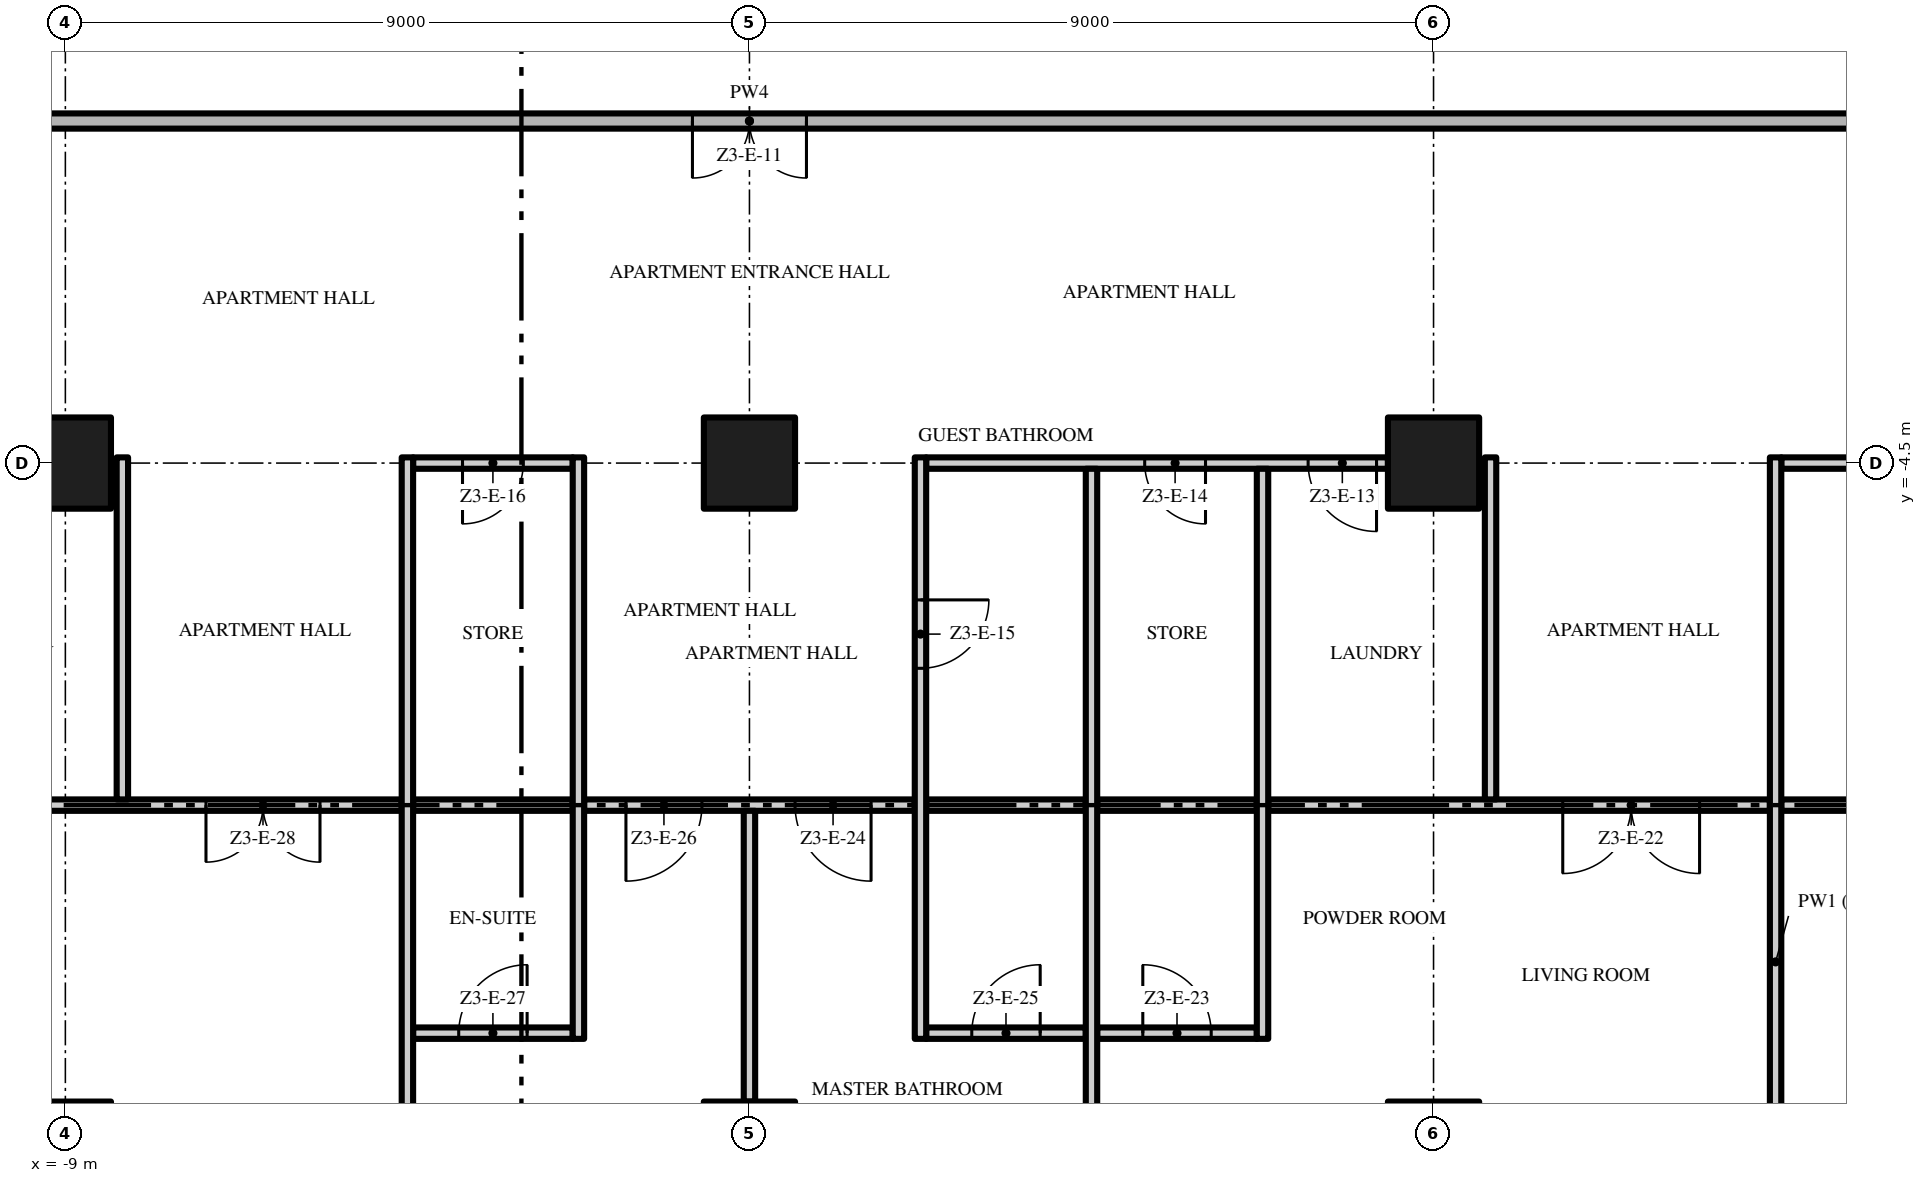
"""IFC4 building model, lengths in metres.
Left out: names, types, materials, properties, quantities, classifications, styles, units other than length and angle.
Written with IfcOpenShell. Run it as: python <this file> out.ifc"""

import sys

from ifc_helpers import new_model, si_unit, direction, frame, frame_2d, origin, origin_2d, place, context, subcontext, project, spatial, rectangle, extrude, element, fill, save


model = new_model("IFC4")
c1 = context("Model", 3, precision=1e-05, world=origin(), true_north=direction((0.0, 1.0)))
c2 = subcontext(c1, "Body", "Model", "MODEL_VIEW")
j1 = project(units=[si_unit("LENGTHUNIT", "METRE"), si_unit("PLANEANGLEUNIT", "RADIAN")], contexts=[c1])
p1 = place(None, origin())
s1 = spatial("IfcSite", under=j1, at=p1, CompositionType="ELEMENT")
p2 = place(p1, origin())
s2 = spatial("IfcBuilding", under=s1, at=p2, CompositionType="ELEMENT")
p3 = place(p2, frame((0.0, 0.0, 166.8)))
s3 = spatial("IfcBuildingStorey", under=s2, at=p3, CompositionType="ELEMENT", Elevation=166.8)
for number, where, z_axis, x_axis in (
    (1, (-9.0, -13.5, 0.0), (0.0, 0.0, 1.0), (1.0, 0.0, 0.0)),
    (2, (-9.0, -4.5, 0.0), (0.0, 0.0, 1.0), (1.0, 0.0, 0.0)),
    (3, (0.0, -13.5, 0.0), (0.0, 0.0, 1.0), (1.0, 0.0, 0.0)),
    (4, (0.0, -4.5, 0.0), (0.0, 0.0, 1.0), (1.0, 0.0, 0.0)),
    (5, (9.0, -13.5, 0.0), (0.0, 0.0, 1.0), (1.0, 0.0, 0.0)),
    (6, (9.0, -4.5, 0.0), (0.0, 0.0, 1.0), (1.0, 0.0, 0.0)),
):
    element("IfcColumn", number, at=place(p3, frame(where, z_axis=z_axis, x_axis=x_axis)), inside=s3, PredefinedType="COLUMN", context=c2, shape_type="SweptSolid", body=[
        extrude(rectangle(XDim=1.2, YDim=1.2, at=origin_2d()), origin(), (0.0, 0.0, 1.0), 3.5),
    ])
p4 = place(p3, frame((-4.425, -12.0, 0.0), z_axis=(0.0, 0.0, 1.0), x_axis=(1.0, 0.0, 0.0)))
e7 = element("IfcWall", 7, at=p4, inside=s3, PredefinedType="PARTITIONING", context=c2, shape_type="SweptSolid", body=[
    extrude(rectangle(XDim=2.1, YDim=0.15, at=frame_2d((1.05, 0.0))), origin(), (0.0, 0.0, 1.0), 3.5),
])
p5 = place(p4, frame((0.6, 0.0, 0.0)))
e8 = element("IfcOpeningElement", 8, at=p5, cuts=e7, PredefinedType="OPENING", context=c2, shape_type="SweptSolid", body=[
    extrude(rectangle(XDim=0.9, YDim=2.1, at=frame_2d((0.45, 1.05))), frame((0.0, 0.085, 0.0), z_axis=(0.0, -1.0, 0.0), x_axis=(1.0, 0.0, 0.0)), (0.0, 0.0, 1.0), 0.17),
])
p6 = place(p3, frame((2.325, -12.0, 0.0), z_axis=(0.0, 0.0, 1.0), x_axis=(1.0, 0.0, 0.0)))
e9 = element("IfcWall", 9, at=p6, inside=s3, PredefinedType="PARTITIONING", context=c2, shape_type="SweptSolid", body=[
    extrude(rectangle(XDim=2.1, YDim=0.15, at=frame_2d((1.05, 0.0))), origin(), (0.0, 0.0, 1.0), 3.5),
])
p7 = place(p6, frame((0.6, 0.0, 0.0)))
e10 = element("IfcOpeningElement", 10, at=p7, cuts=e9, PredefinedType="OPENING", context=c2, shape_type="SweptSolid", body=[
    extrude(rectangle(XDim=0.9, YDim=2.1, at=frame_2d((0.45, 1.05))), frame((0.0, 0.085, 0.0), z_axis=(0.0, -1.0, 0.0), x_axis=(1.0, 0.0, 0.0)), (0.0, 0.0, 1.0), 0.17),
])
p8 = place(p3, frame((4.575, -12.0, 0.0), z_axis=(0.0, 0.0, 1.0), x_axis=(1.0, 0.0, 0.0)))
e11 = element("IfcWall", 11, at=p8, inside=s3, PredefinedType="PARTITIONING", context=c2, shape_type="SweptSolid", body=[
    extrude(rectangle(XDim=2.1, YDim=0.15, at=frame_2d((1.05, 0.0))), origin(), (0.0, 0.0, 1.0), 3.5),
])
p9 = place(p8, frame((0.6, 0.0, 0.0)))
e12 = element("IfcOpeningElement", 12, at=p9, cuts=e11, PredefinedType="OPENING", context=c2, shape_type="SweptSolid", body=[
    extrude(rectangle(XDim=0.9, YDim=2.1, at=frame_2d((0.45, 1.05))), frame((0.0, 0.085, 0.0), z_axis=(0.0, -1.0, 0.0), x_axis=(1.0, 0.0, 0.0)), (0.0, 0.0, 1.0), 0.17),
])
p10 = place(p3, frame((-4.575, -9.0, 0.0), z_axis=(0.0, 0.0, 1.0), x_axis=(-1.0, 0.0, 0.0)))
e13 = element("IfcWall", 13, at=p10, inside=s3, PredefinedType="PARTITIONING", context=c2, shape_type="SweptSolid", body=[
    extrude(rectangle(XDim=8.85, YDim=0.15, at=frame_2d((4.425, 0.0))), origin(), (0.0, 0.0, 1.0), 3.5),
])
p11 = place(p10, frame((1.075, 0.0, 0.0)))
e14 = element("IfcOpeningElement", 14, at=p11, cuts=e13, PredefinedType="OPENING", context=c2, shape_type="SweptSolid", body=[
    extrude(rectangle(XDim=1.5, YDim=2.4, at=frame_2d((0.75, 1.2))), frame((0.0, 0.085, 0.0), z_axis=(0.0, -1.0, 0.0), x_axis=(1.0, 0.0, 0.0)), (0.0, 0.0, 1.0), 0.17),
])
p12 = place(p3, frame((-4.425, -9.0, 0.0), z_axis=(0.0, 0.0, 1.0), x_axis=(1.0, 0.0, 0.0)))
e15 = element("IfcWall", 15, at=p12, inside=s3, PredefinedType="PARTITIONING", context=c2, shape_type="SweptSolid", body=[
    extrude(rectangle(XDim=2.1, YDim=0.15, at=frame_2d((1.05, 0.0))), origin(), (0.0, 0.0, 1.0), 3.5),
])
p13 = place(p3, frame((2.175, -9.0, 0.0), z_axis=(0.0, 0.0, 1.0), x_axis=(-1.0, 0.0, 0.0)))
e16 = element("IfcWall", 16, at=p13, inside=s3, PredefinedType="PARTITIONING", context=c2, shape_type="SweptSolid", body=[
    extrude(rectangle(XDim=4.35, YDim=0.15, at=frame_2d((2.175, 0.0))), origin(), (0.0, 0.0, 1.0), 3.5),
])
p14 = place(p13, frame((0.575, 0.0, 0.0)))
e17 = element("IfcOpeningElement", 17, at=p14, cuts=e16, PredefinedType="OPENING", context=c2, shape_type="SweptSolid", body=[
    extrude(rectangle(XDim=1.0, YDim=2.4, at=frame_2d((0.5, 1.2))), frame((0.0, 0.085, 0.0), z_axis=(0.0, -1.0, 0.0), x_axis=(1.0, 0.0, 0.0)), (0.0, 0.0, 1.0), 0.17),
])
p15 = place(p13, frame((2.8, 0.0, 0.0)))
e18 = element("IfcOpeningElement", 18, at=p15, cuts=e16, PredefinedType="OPENING", context=c2, shape_type="SweptSolid", body=[
    extrude(rectangle(XDim=1.0, YDim=2.4, at=frame_2d((0.5, 1.2))), frame((0.0, 0.085, 0.0), z_axis=(0.0, -1.0, 0.0), x_axis=(1.0, 0.0, 0.0)), (0.0, 0.0, 1.0), 0.17),
])
for number, where, z_axis, x_axis in (
    (19, (2.325, -9.0, 0.0), (0.0, 0.0, 1.0), (1.0, 0.0, 0.0)),
    (20, (4.575, -9.0, 0.0), (0.0, 0.0, 1.0), (1.0, 0.0, 0.0)),
):
    element("IfcWall", number, at=place(p3, frame(where, z_axis=z_axis, x_axis=x_axis)), inside=s3, PredefinedType="PARTITIONING", context=c2, shape_type="SweptSolid", body=[
        extrude(rectangle(XDim=2.1, YDim=0.15, at=frame_2d((1.05, 0.0))), origin(), (0.0, 0.0, 1.0), 3.5),
    ])
p16 = place(p3, frame((13.425, -9.0, 0.0), z_axis=(0.0, 0.0, 1.0), x_axis=(-1.0, 0.0, 0.0)))
e21 = element("IfcWall", 21, at=p16, inside=s3, PredefinedType="PARTITIONING", context=c2, shape_type="SweptSolid", body=[
    extrude(rectangle(XDim=6.6, YDim=0.15, at=frame_2d((3.3, 0.0))), origin(), (0.0, 0.0, 1.0), 3.5),
])
p17 = place(p16, frame((0.925, 0.0, 0.0)))
e22 = element("IfcOpeningElement", 22, at=p17, cuts=e21, PredefinedType="OPENING", context=c2, shape_type="SweptSolid", body=[
    extrude(rectangle(XDim=1.8, YDim=2.4, at=frame_2d((0.9, 1.2))), frame((0.0, 0.085, 0.0), z_axis=(0.0, -1.0, 0.0), x_axis=(1.0, 0.0, 0.0)), (0.0, 0.0, 1.0), 0.17),
])
p18 = place(p3, frame((22.2, -9.0, 0.0), z_axis=(0.0, 0.0, 1.0), x_axis=(-1.0, 0.0, 0.0)))
e23 = element("IfcWall", 23, at=p18, inside=s3, PredefinedType="PARTITIONING", context=c2, shape_type="SweptSolid", body=[
    extrude(rectangle(XDim=8.625, YDim=0.15, at=frame_2d((4.312, 0.0))), origin(), (0.0, 0.0, 1.0), 3.5),
])
p19 = place(p18, frame((0.8, 0.0, 0.0)))
e24 = element("IfcOpeningElement", 24, at=p19, cuts=e23, PredefinedType="OPENING", context=c2, shape_type="SweptSolid", body=[
    extrude(rectangle(XDim=1.5, YDim=2.4, at=frame_2d((0.75, 1.2))), frame((0.0, 0.085, 0.0), z_axis=(0.0, -1.0, 0.0), x_axis=(1.0, 0.0, 0.0)), (0.0, 0.0, 1.0), 0.17),
])
p20 = place(p3, frame((-2.325, -4.5, 0.0), z_axis=(0.0, 0.0, 1.0), x_axis=(-1.0, 0.0, 0.0)))
e25 = element("IfcWall", 25, at=p20, inside=s3, PredefinedType="PARTITIONING", context=c2, shape_type="SweptSolid", body=[
    extrude(rectangle(XDim=2.1, YDim=0.15, at=frame_2d((1.05, 0.0))), origin(), (0.0, 0.0, 1.0), 3.5),
])
p21 = place(p20, frame((0.65, 0.0, 0.0)))
e26 = element("IfcOpeningElement", 26, at=p21, cuts=e25, PredefinedType="OPENING", context=c2, shape_type="SweptSolid", body=[
    extrude(rectangle(XDim=0.8, YDim=2.0, at=frame_2d((0.4, 1.0))), frame((0.0, 0.085, 0.0), z_axis=(0.0, -1.0, 0.0), x_axis=(1.0, 0.0, 0.0)), (0.0, 0.0, 1.0), 0.17),
])
p22 = place(p3, frame((8.4, -4.5, 0.0), z_axis=(0.0, 0.0, 1.0), x_axis=(-1.0, 0.0, 0.0)))
e27 = element("IfcWall", 27, at=p22, inside=s3, PredefinedType="PARTITIONING", context=c2, shape_type="SweptSolid", body=[
    extrude(rectangle(XDim=6.075, YDim=0.15, at=frame_2d((3.038, 0.0))), origin(), (0.0, 0.0, 1.0), 3.5),
])
p23 = place(p22, frame((0.15, 0.0, 0.0)))
e28 = element("IfcOpeningElement", 28, at=p23, cuts=e27, PredefinedType="OPENING", context=c2, shape_type="SweptSolid", body=[
    extrude(rectangle(XDim=0.9, YDim=2.1, at=frame_2d((0.45, 1.05))), frame((0.0, 0.085, 0.0), z_axis=(0.0, -1.0, 0.0), x_axis=(1.0, 0.0, 0.0)), (0.0, 0.0, 1.0), 0.17),
])
p24 = place(p22, frame((2.4, 0.0, 0.0)))
e29 = element("IfcOpeningElement", 29, at=p24, cuts=e27, PredefinedType="OPENING", context=c2, shape_type="SweptSolid", body=[
    extrude(rectangle(XDim=0.8, YDim=2.0, at=frame_2d((0.4, 1.0))), frame((0.0, 0.085, 0.0), z_axis=(0.0, -1.0, 0.0), x_axis=(1.0, 0.0, 0.0)), (0.0, 0.0, 1.0), 0.17),
])
p25 = place(p3, frame((17.4, -4.5, 0.0), z_axis=(0.0, 0.0, 1.0), x_axis=(-1.0, 0.0, 0.0)))
e30 = element("IfcWall", 30, at=p25, inside=s3, PredefinedType="PARTITIONING", context=c2, shape_type="SweptSolid", body=[
    extrude(rectangle(XDim=3.825, YDim=0.15, at=frame_2d((1.913, 0.0))), origin(), (0.0, 0.0, 1.0), 3.5),
])
p26 = place(p25, frame((0.775, 0.0, 0.0)))
e31 = element("IfcOpeningElement", 31, at=p26, cuts=e30, PredefinedType="OPENING", context=c2, shape_type="SweptSolid", body=[
    extrude(rectangle(XDim=1.0, YDim=2.4, at=frame_2d((0.5, 1.2))), frame((0.0, 0.085, 0.0), z_axis=(0.0, -1.0, 0.0), x_axis=(1.0, 0.0, 0.0)), (0.0, 0.0, 1.0), 0.17),
])
p27 = place(p3, frame((17.5, 0.0, 0.0), z_axis=(0.0, 0.0, 1.0), x_axis=(-1.0, 0.0, 0.0)))
e32 = element("IfcWall", 32, at=p27, inside=s3, PredefinedType="PARTITIONING", context=c2, shape_type="SweptSolid", body=[
    extrude(rectangle(XDim=35.0, YDim=0.2, at=frame_2d((17.5, 0.0))), origin(), (0.0, 0.0, 1.0), 3.5),
])
p28 = place(p27, frame((16.75, 0.0, 0.0)))
e33 = element("IfcOpeningElement", 33, at=p28, cuts=e32, PredefinedType="OPENING", context=c2, shape_type="SweptSolid", body=[
    extrude(rectangle(XDim=1.5, YDim=2.4, at=frame_2d((0.75, 1.2))), frame((0.0, 0.11, 0.0), z_axis=(0.0, -1.0, 0.0), x_axis=(1.0, 0.0, 0.0)), (0.0, 0.0, 1.0), 0.22),
])
p29 = place(p3, frame((-8.25, -8.925, 0.0), z_axis=(0.0, 0.0, 1.0), x_axis=(0.0, 1.0, 0.0)))
e34 = element("IfcWall", 34, at=p29, inside=s3, PredefinedType="PARTITIONING", context=c2, shape_type="SweptSolid", body=[
    extrude(rectangle(XDim=4.5, YDim=0.15, at=frame_2d((2.25, 0.0))), origin(), (0.0, 0.0, 1.0), 3.5),
])
p30 = place(p3, frame((-4.5, -17.7, 0.0), z_axis=(0.0, 0.0, 1.0), x_axis=(0.0, 1.0, 0.0)))
e35 = element("IfcWall", 35, at=p30, inside=s3, PredefinedType="PARTITIONING", context=c2, shape_type="SweptSolid", body=[
    extrude(rectangle(XDim=13.275, YDim=0.15, at=frame_2d((6.638, 0.0))), origin(), (0.0, 0.0, 1.0), 3.5),
])
p31 = place(p3, frame((-2.25, -12.075, 0.0), z_axis=(0.0, 0.0, 1.0), x_axis=(0.0, 1.0, 0.0)))
e36 = element("IfcWall", 36, at=p31, inside=s3, PredefinedType="PARTITIONING", context=c2, shape_type="SweptSolid", body=[
    extrude(rectangle(XDim=7.65, YDim=0.15, at=frame_2d((3.825, 0.0))), origin(), (0.0, 0.0, 1.0), 3.5),
])
p32 = place(p3, frame((0.0, -12.9, 0.0), z_axis=(0.0, 0.0, 1.0), x_axis=(0.0, 1.0, 0.0)))
e37 = element("IfcWall", 37, at=p32, inside=s3, PredefinedType="PARTITIONING", context=c2, shape_type="SweptSolid", body=[
    extrude(rectangle(XDim=3.825, YDim=0.15, at=frame_2d((1.913, 0.0))), origin(), (0.0, 0.0, 1.0), 3.5),
])
p33 = place(p3, frame((2.25, -4.425, 0.0), z_axis=(0.0, 0.0, 1.0), x_axis=(0.0, -1.0, 0.0)))
e38 = element("IfcWall", 38, at=p33, inside=s3, PredefinedType="PARTITIONING", context=c2, shape_type="SweptSolid", body=[
    extrude(rectangle(XDim=7.65, YDim=0.15, at=frame_2d((3.825, 0.0))), origin(), (0.0, 0.0, 1.0), 3.5),
])
p34 = place(p33, frame((1.875, 0.0, 0.0)))
e39 = element("IfcOpeningElement", 39, at=p34, cuts=e38, PredefinedType="OPENING", context=c2, shape_type="SweptSolid", body=[
    extrude(rectangle(XDim=0.9, YDim=2.1, at=frame_2d((0.45, 1.05))), frame((0.0, 0.085, 0.0), z_axis=(0.0, -1.0, 0.0), x_axis=(1.0, 0.0, 0.0)), (0.0, 0.0, 1.0), 0.17),
])
p35 = place(p3, frame((4.5, -17.7, 0.0), z_axis=(0.0, 0.0, 1.0), x_axis=(0.0, 1.0, 0.0)))
e40 = element("IfcWall", 40, at=p35, inside=s3, PredefinedType="PARTITIONING", context=c2, shape_type="SweptSolid", body=[
    extrude(rectangle(XDim=13.125, YDim=0.15, at=frame_2d((6.562, 0.0))), origin(), (0.0, 0.0, 1.0), 3.5),
])
p36 = place(p3, frame((6.75, -12.075, 0.0), z_axis=(0.0, 0.0, 1.0), x_axis=(0.0, 1.0, 0.0)))
e41 = element("IfcWall", 41, at=p36, inside=s3, PredefinedType="PARTITIONING", context=c2, shape_type="SweptSolid", body=[
    extrude(rectangle(XDim=7.5, YDim=0.15, at=frame_2d((3.75, 0.0))), origin(), (0.0, 0.0, 1.0), 3.5),
])
p37 = place(p3, frame((9.75, -8.925, 0.0), z_axis=(0.0, 0.0, 1.0), x_axis=(0.0, 1.0, 0.0)))
e42 = element("IfcWall", 42, at=p37, inside=s3, PredefinedType="PARTITIONING", context=c2, shape_type="SweptSolid", body=[
    extrude(rectangle(XDim=4.5, YDim=0.15, at=frame_2d((2.25, 0.0))), origin(), (0.0, 0.0, 1.0), 3.5),
])
p38 = place(p3, frame((13.5, -17.7, 0.0), z_axis=(0.0, 0.0, 1.0), x_axis=(0.0, 1.0, 0.0)))
e43 = element("IfcWall", 43, at=p38, inside=s3, PredefinedType="PARTITIONING", context=c2, shape_type="SweptSolid", body=[
    extrude(rectangle(XDim=13.275, YDim=0.15, at=frame_2d((6.638, 0.0))), origin(), (0.0, 0.0, 1.0), 3.5),
])
p39 = place(p28, origin())
e44 = element("IfcDoor", 44, at=p39, inside=s3, OperationType="DOUBLE_DOOR_SINGLE_SWING", PredefinedType="DOOR", context=c2, shape_type="SweptSolid", body=[
    extrude(rectangle(XDim=1.5, YDim=2.4, at=frame_2d((0.75, 1.2))), frame((0.0, 0.025, 0.0), z_axis=(0.0, -1.0, 0.0), x_axis=(1.0, 0.0, 0.0)), (0.0, 0.0, 1.0), 0.05),
])
fill(e33, e44)
p40 = place(p23, origin())
e45 = element("IfcDoor", 45, at=p40, inside=s3, OperationType="SINGLE_SWING_LEFT", PredefinedType="DOOR", context=c2, shape_type="SweptSolid", body=[
    extrude(rectangle(XDim=0.9, YDim=2.1, at=frame_2d((0.45, 1.05))), frame((0.0, 0.025, 0.0), z_axis=(0.0, -1.0, 0.0), x_axis=(1.0, 0.0, 0.0)), (0.0, 0.0, 1.0), 0.05),
])
fill(e28, e45)
p41 = place(p24, origin())
e46 = element("IfcDoor", 46, at=p41, inside=s3, OperationType="SINGLE_SWING_LEFT", PredefinedType="DOOR", context=c2, shape_type="SweptSolid", body=[
    extrude(rectangle(XDim=0.8, YDim=2.0, at=frame_2d((0.4, 1.0))), frame((0.0, 0.025, 0.0), z_axis=(0.0, -1.0, 0.0), x_axis=(1.0, 0.0, 0.0)), (0.0, 0.0, 1.0), 0.05),
])
fill(e29, e46)
p42 = place(p34, origin())
e47 = element("IfcDoor", 47, at=p42, inside=s3, OperationType="SINGLE_SWING_LEFT", PredefinedType="DOOR", context=c2, shape_type="SweptSolid", body=[
    extrude(rectangle(XDim=0.9, YDim=2.1, at=frame_2d((0.45, 1.05))), frame((0.0, 0.025, 0.0), z_axis=(0.0, -1.0, 0.0), x_axis=(1.0, 0.0, 0.0)), (0.0, 0.0, 1.0), 0.05),
])
fill(e39, e47)
p43 = place(p21, origin())
e48 = element("IfcDoor", 48, at=p43, inside=s3, OperationType="SINGLE_SWING_RIGHT", PredefinedType="DOOR", context=c2, shape_type="SweptSolid", body=[
    extrude(rectangle(XDim=0.8, YDim=2.0, at=frame_2d((0.4, 1.0))), frame((0.0, 0.025, 0.0), z_axis=(0.0, -1.0, 0.0), x_axis=(1.0, 0.0, 0.0)), (0.0, 0.0, 1.0), 0.05),
])
fill(e26, e48)
p44 = place(p17, origin())
e49 = element("IfcDoor", 49, at=p44, inside=s3, OperationType="DOUBLE_DOOR_SINGLE_SWING", PredefinedType="DOOR", context=c2, shape_type="SweptSolid", body=[
    extrude(rectangle(XDim=1.8, YDim=2.4, at=frame_2d((0.9, 1.2))), frame((0.0, 0.025, 0.0), z_axis=(0.0, -1.0, 0.0), x_axis=(1.0, 0.0, 0.0)), (0.0, 0.0, 1.0), 0.05),
])
fill(e22, e49)
p45 = place(p9, origin())
e50 = element("IfcDoor", 50, at=p45, inside=s3, OperationType="SINGLE_SWING_LEFT", PredefinedType="DOOR", context=c2, shape_type="SweptSolid", body=[
    extrude(rectangle(XDim=0.9, YDim=2.1, at=frame_2d((0.45, 1.05))), frame((0.0, 0.025, 0.0), z_axis=(0.0, -1.0, 0.0), x_axis=(1.0, 0.0, 0.0)), (0.0, 0.0, 1.0), 0.05),
])
fill(e12, e50)
p46 = place(p14, origin())
e51 = element("IfcDoor", 51, at=p46, inside=s3, OperationType="SINGLE_SWING_LEFT", PredefinedType="DOOR", context=c2, shape_type="SweptSolid", body=[
    extrude(rectangle(XDim=1.0, YDim=2.4, at=frame_2d((0.5, 1.2))), frame((0.0, 0.025, 0.0), z_axis=(0.0, -1.0, 0.0), x_axis=(1.0, 0.0, 0.0)), (0.0, 0.0, 1.0), 0.05),
])
fill(e17, e51)
p47 = place(p7, origin())
e52 = element("IfcDoor", 52, at=p47, inside=s3, OperationType="SINGLE_SWING_RIGHT", PredefinedType="DOOR", context=c2, shape_type="SweptSolid", body=[
    extrude(rectangle(XDim=0.9, YDim=2.1, at=frame_2d((0.45, 1.05))), frame((0.0, 0.025, 0.0), z_axis=(0.0, -1.0, 0.0), x_axis=(1.0, 0.0, 0.0)), (0.0, 0.0, 1.0), 0.05),
])
fill(e10, e52)
p48 = place(p15, origin())
e53 = element("IfcDoor", 53, at=p48, inside=s3, OperationType="SINGLE_SWING_RIGHT", PredefinedType="DOOR", context=c2, shape_type="SweptSolid", body=[
    extrude(rectangle(XDim=1.0, YDim=2.4, at=frame_2d((0.5, 1.2))), frame((0.0, 0.025, 0.0), z_axis=(0.0, -1.0, 0.0), x_axis=(1.0, 0.0, 0.0)), (0.0, 0.0, 1.0), 0.05),
])
fill(e18, e53)
p49 = place(p5, origin())
e54 = element("IfcDoor", 54, at=p49, inside=s3, OperationType="SINGLE_SWING_RIGHT", PredefinedType="DOOR", context=c2, shape_type="SweptSolid", body=[
    extrude(rectangle(XDim=0.9, YDim=2.1, at=frame_2d((0.45, 1.05))), frame((0.0, 0.025, 0.0), z_axis=(0.0, -1.0, 0.0), x_axis=(1.0, 0.0, 0.0)), (0.0, 0.0, 1.0), 0.05),
])
fill(e8, e54)
p50 = place(p11, origin())
e55 = element("IfcDoor", 55, at=p50, inside=s3, OperationType="DOUBLE_DOOR_SINGLE_SWING", PredefinedType="DOOR", context=c2, shape_type="SweptSolid", body=[
    extrude(rectangle(XDim=1.5, YDim=2.4, at=frame_2d((0.75, 1.2))), frame((0.0, 0.025, 0.0), z_axis=(0.0, -1.0, 0.0), x_axis=(1.0, 0.0, 0.0)), (0.0, 0.0, 1.0), 0.05),
])
fill(e14, e55)
save(model, sys.argv[1])
